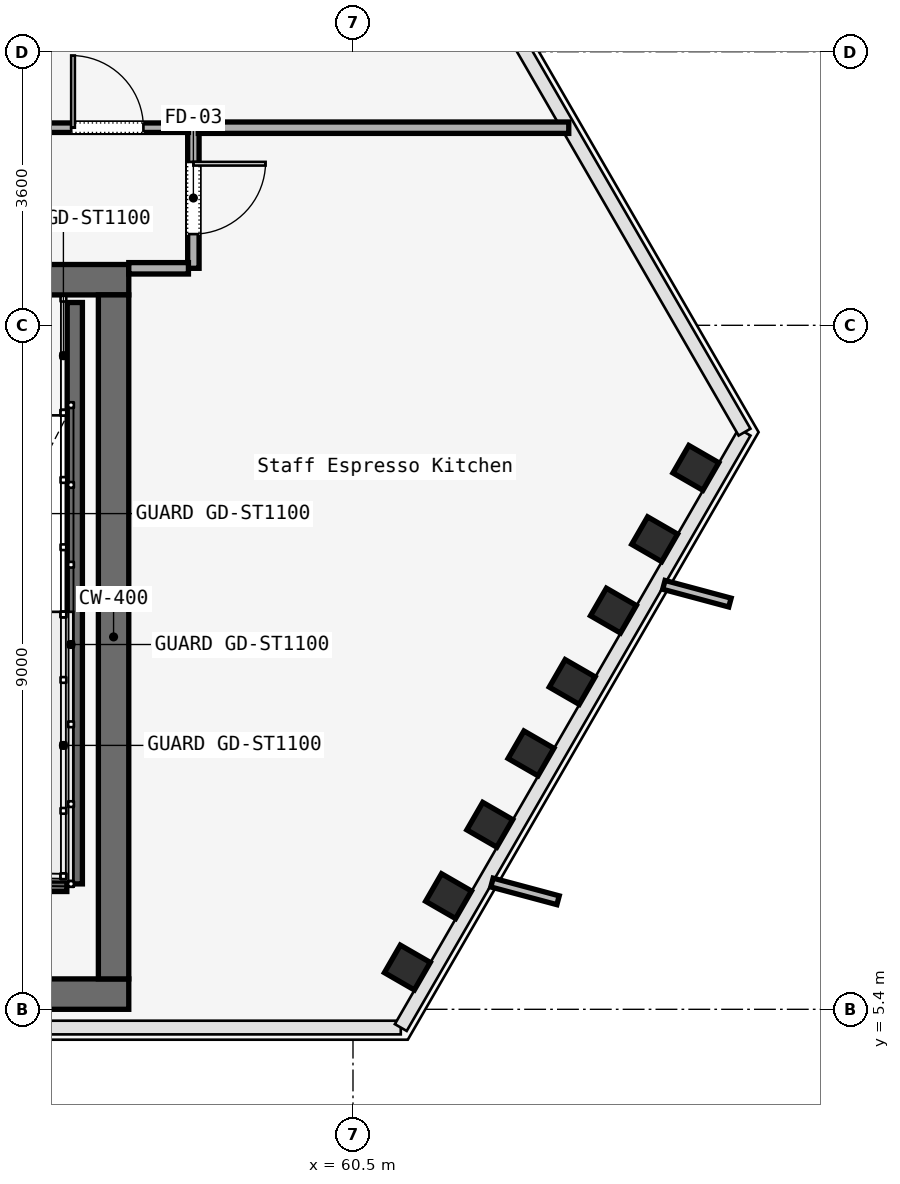
"""IFC4 building model, lengths in metres.
Left out: names, types, materials, properties, quantities, classifications, styles, units other than length and angle.
Written with IfcOpenShell. Run it as: python <this file> out.ifc"""

import sys

from ifc_helpers import new_model, si_unit, direction, frame, frame_2d, origin, origin_2d, place, context, subcontext, project, spatial, rectangle, i_section, extrude, element, fill, save


model = new_model("IFC4")
c1 = context("Model", 3, precision=1e-05, world=origin(), true_north=direction((0.0, 1.0)))
c2 = subcontext(c1, "Body", "Model", "MODEL_VIEW")
j1 = project(units=[si_unit("LENGTHUNIT", "METRE"), si_unit("PLANEANGLEUNIT", "RADIAN")], contexts=[c1])
p1 = place(None, origin())
s1 = spatial("IfcSite", under=j1, at=p1, CompositionType="ELEMENT")
p2 = place(p1, origin())
s2 = spatial("IfcBuilding", under=s1, at=p2, CompositionType="ELEMENT")
p3 = place(p2, frame((0.0, 0.0, 191.6)))
s3 = spatial("IfcBuildingStorey", under=s2, at=p3, CompositionType="ELEMENT", Elevation=191.6)
p4 = place(p3, frame((26.45, 15.0, 0.0), z_axis=(0.0, 0.0, 1.0), x_axis=(1.0, 0.0, 0.0)))
e1 = element("IfcWall", 1, at=p4, inside=s3, PredefinedType="SOLIDWALL", context=c2, shape_type="SweptSolid", body=[
    extrude(rectangle(XDim=31.1, YDim=0.4, at=frame_2d((15.55, 0.0))), origin(), (0.0, 0.0, 1.0), 3.58),
])
p5 = place(p4, frame((1.65, 0.0, 0.0)))
e2 = element("IfcOpeningElement", 2, at=p5, cuts=e1, PredefinedType="OPENING", context=c2, shape_type="SweptSolid", body=[
    extrude(rectangle(XDim=1.1, YDim=2.2, at=frame_2d((0.55, 1.1))), frame((0.0, 0.2, 0.0), z_axis=(0.0, -1.0, 0.0), x_axis=(1.0, 0.0, 0.0)), (0.0, 0.0, 1.0), 0.4),
])
p6 = place(p4, frame((13.65, 0.0, 0.0)))
e3 = element("IfcOpeningElement", 3, at=p6, cuts=e1, PredefinedType="OPENING", context=c2, shape_type="SweptSolid", body=[
    extrude(rectangle(XDim=1.1, YDim=2.2, at=frame_2d((0.55, 1.1))), frame((0.0, 0.2, 0.0), z_axis=(0.0, -1.0, 0.0), x_axis=(1.0, 0.0, 0.0)), (0.0, 0.0, 1.0), 0.4),
])
p7 = place(p4, frame((25.55, 0.0, 0.0)))
e4 = element("IfcOpeningElement", 4, at=p7, cuts=e1, PredefinedType="OPENING", context=c2, shape_type="SweptSolid", body=[
    extrude(rectangle(XDim=1.1, YDim=2.2, at=frame_2d((0.55, 1.1))), frame((0.0, 0.2, 0.0), z_axis=(0.0, -1.0, 0.0), x_axis=(1.0, 0.0, 0.0)), (0.0, 0.0, 1.0), 0.4),
])
p8 = place(p4, frame((10.7, 0.0, 0.0)))
e5 = element("IfcOpeningElement", 5, at=p8, cuts=e1, PredefinedType="OPENING", context=c2, shape_type="SweptSolid", body=[
    extrude(rectangle(XDim=1.4, YDim=2.2, at=frame_2d((0.7, 1.1))), frame((0.0, 0.2, 0.0), z_axis=(0.0, -1.0, 0.0), x_axis=(1.0, 0.0, 0.0)), (0.0, 0.0, 1.0), 0.4),
])
p9 = place(p4, frame((19.35, 0.0, 0.0)))
e6 = element("IfcOpeningElement", 6, at=p9, cuts=e1, PredefinedType="OPENING", context=c2, shape_type="SweptSolid", body=[
    extrude(rectangle(XDim=1.1, YDim=2.2, at=frame_2d((0.55, 1.1))), frame((0.0, 0.2, 0.0), z_axis=(0.0, -1.0, 0.0), x_axis=(1.0, 0.0, 0.0)), (0.0, 0.0, 1.0), 0.4),
])
p10 = place(p4, frame((21.4, 0.0, 0.0)))
e7 = element("IfcOpeningElement", 7, at=p10, cuts=e1, PredefinedType="OPENING", context=c2, shape_type="SweptSolid", body=[
    extrude(rectangle(XDim=0.9, YDim=2.1, at=frame_2d((0.45, 1.05))), frame((0.0, 0.2, 0.0), z_axis=(0.0, -1.0, 0.0), x_axis=(1.0, 0.0, 0.0)), (0.0, 0.0, 1.0), 0.4),
])
p11 = place(p4, frame((23.35, 0.0, 0.0)))
e8 = element("IfcOpeningElement", 8, at=p11, cuts=e1, PredefinedType="OPENING", context=c2, shape_type="SweptSolid", body=[
    extrude(rectangle(XDim=1.3, YDim=2.3, at=frame_2d((0.65, 1.15))), frame((0.0, 0.2, 0.0), z_axis=(0.0, -1.0, 0.0), x_axis=(1.0, 0.0, 0.0)), (0.0, 0.0, 1.0), 0.4),
])
p12 = place(p3, frame((26.45, 5.6, 0.0), z_axis=(0.0, 0.0, 1.0), x_axis=(1.0, 0.0, 0.0)))
e9 = element("IfcWall", 9, at=p12, inside=s3, PredefinedType="SOLIDWALL", context=c2, shape_type="SweptSolid", body=[
    extrude(rectangle(XDim=31.1, YDim=0.4, at=frame_2d((15.55, 0.0))), origin(), (0.0, 0.0, 1.0), 3.58),
])
p13 = place(p3, frame((57.35, 5.8, 0.0), z_axis=(0.0, 0.0, 1.0), x_axis=(0.0, 1.0, 0.0)))
e10 = element("IfcWall", 10, at=p13, inside=s3, PredefinedType="SOLIDWALL", context=c2, shape_type="SweptSolid", body=[
    extrude(rectangle(XDim=9.0, YDim=0.4, at=frame_2d((4.5, 0.0))), origin(), (0.0, 0.0, 1.0), 3.58),
])
for number, where, z_axis, x_axis in (
    (11, (61.215, 5.95, 0.0), (0.0, 0.0, 1.0), (0.5, 0.866, 0.0)),
    (12, (61.757, 6.889, 0.0), (0.0, 0.0, 1.0), (0.5, 0.866, 0.0)),
    (13, (62.3, 7.828, 0.0), (0.0, 0.0, 1.0), (0.5, 0.866, 0.0)),
    (14, (62.842, 8.767, 0.0), (0.0, 0.0, 1.0), (0.5, 0.866, 0.0)),
    (15, (63.384, 9.707, 0.0), (0.0, 0.0, 1.0), (0.5, 0.866, 0.0)),
    (16, (63.927, 10.646, 0.0), (0.0, 0.0, 1.0), (0.5, 0.866, 0.0)),
    (17, (64.469, 11.585, 0.0), (0.0, 0.0, 1.0), (0.5, 0.866, 0.0)),
    (18, (65.011, 12.524, 0.0), (0.0, 0.0, 1.0), (0.5, 0.866, 0.0)),
):
    element("IfcColumn", number, at=place(p3, frame(where, z_axis=z_axis, x_axis=x_axis)), inside=s3, PredefinedType="COLUMN", context=c2, shape_type="SweptSolid", body=[
        extrude(i_section(OverallWidth=0.418, OverallDepth=0.455, WebThickness=0.042, FlangeThickness=0.052, FilletRadius=0.015, at=origin_2d()), origin(), (0.0, 0.0, 1.0), 3.58),
    ])
p14 = place(p3, frame((56.84, 14.7, 0.0), z_axis=(0.0, 0.0, 1.0), x_axis=(0.0, -1.0, 0.0)))
e19 = element("IfcWall", 19, at=p14, inside=s3, PredefinedType="SOLIDWALL", context=c2, shape_type="SweptSolid", body=[
    extrude(rectangle(XDim=7.65, YDim=0.2, at=frame_2d((3.825, 0.0))), origin(), (0.0, 0.0, 1.0), 3.8),
])
p15 = place(p3, frame((53.62, 7.05, 0.0), z_axis=(0.0, 0.0, 1.0), x_axis=(1.0, 0.0, 0.0)))
e20 = element("IfcWall", 20, at=p15, inside=s3, PredefinedType="SOLIDWALL", context=c2, shape_type="SweptSolid", body=[
    extrude(rectangle(XDim=3.115, YDim=0.2, at=frame_2d((1.558, 0.0))), origin(), (0.0, 0.0, 1.0), 3.8),
])
p16 = place(p3, frame((58.4, 17.0, 0.0), z_axis=(0.0, 0.0, 1.0), x_axis=(0.0, -1.0, 0.0)))
e21 = element("IfcWall", 21, at=p16, inside=s3, PredefinedType="PARTITIONING", context=c2, shape_type="SweptSolid", body=[
    extrude(rectangle(XDim=1.85, YDim=0.15, at=frame_2d((0.925, 0.0))), origin(), (0.0, 0.0, 1.0), 3.01),
])
p17 = place(p16, frame((0.45, 0.0, 0.0)))
e22 = element("IfcOpeningElement", 22, at=p17, cuts=e21, PredefinedType="OPENING", context=c2, shape_type="SweptSolid", body=[
    extrude(rectangle(XDim=0.95, YDim=2.2, at=frame_2d((0.475, 1.1))), frame((0.0, 0.075, 0.0), z_axis=(0.0, -1.0, 0.0), x_axis=(1.0, 0.0, 0.0)), (0.0, 0.0, 1.0), 0.15),
])
p18 = place(p3, frame((58.335, 15.15, 0.0), z_axis=(0.0, 0.0, 1.0), x_axis=(-1.0, 0.0, 0.0)))
e23 = element("IfcWall", 23, at=p18, inside=s3, PredefinedType="PARTITIONING", context=c2, shape_type="SweptSolid", body=[
    extrude(rectangle(XDim=0.785, YDim=0.15, at=frame_2d((0.393, 0.0))), origin(), (0.0, 0.0, 1.0), 3.01),
])
p19 = place(p3, frame((56.2, 17.0, 0.0), z_axis=(0.0, 0.0, 1.0), x_axis=(1.0, 0.0, 0.0)))
e24 = element("IfcWall", 24, at=p19, inside=s3, PredefinedType="PARTITIONING", context=c2, shape_type="SweptSolid", body=[
    extrude(rectangle(XDim=2.135, YDim=0.125, at=frame_2d((1.067, 0.0))), origin(), (0.0, 0.0, 1.0), 3.01),
])
p20 = place(p19, frame((0.593, 0.0, 0.0)))
e25 = element("IfcOpeningElement", 25, at=p20, cuts=e24, PredefinedType="OPENING", context=c2, shape_type="SweptSolid", body=[
    extrude(rectangle(XDim=0.95, YDim=2.2, at=frame_2d((0.475, 1.1))), frame((0.0, 0.062, 0.0), z_axis=(0.0, -1.0, 0.0), x_axis=(1.0, 0.0, 0.0)), (0.0, 0.0, 1.0), 0.125),
])
p21 = place(p3, frame((58.465, 17.0, 0.0), z_axis=(0.0, 0.0, 1.0), x_axis=(1.0, 0.0, 0.0)))
e26 = element("IfcWall", 26, at=p21, inside=s3, PredefinedType="PARTITIONING", context=c2, shape_type="SweptSolid", body=[
    extrude(rectangle(XDim=4.874, YDim=0.15, at=frame_2d((2.437, 0.0))), origin(), (0.0, 0.0, 1.0), 3.01),
])
p22 = place(p17, origin())
e27 = element("IfcDoor", 27, at=p22, inside=s3, OperationType="SINGLE_SWING_RIGHT", PredefinedType="DOOR", context=c2, shape_type="SweptSolid", body=[
    extrude(rectangle(XDim=0.95, YDim=2.2, at=frame_2d((0.475, 1.1))), frame((0.0, 0.025, 0.0), z_axis=(0.0, -1.0, 0.0), x_axis=(1.0, 0.0, 0.0)), (0.0, 0.0, 1.0), 0.05),
])
fill(e22, e27)
p23 = place(p20, origin())
e28 = element("IfcDoor", 28, at=p23, inside=s3, OperationType="SINGLE_SWING_RIGHT", PredefinedType="DOOR", context=c2, shape_type="SweptSolid", body=[
    extrude(rectangle(XDim=0.95, YDim=2.2, at=frame_2d((0.475, 1.1))), frame((0.0, 0.025, 0.0), z_axis=(0.0, -1.0, 0.0), x_axis=(1.0, 0.0, 0.0)), (0.0, 0.0, 1.0), 0.05),
])
fill(e25, e28)
save(model, sys.argv[1])
